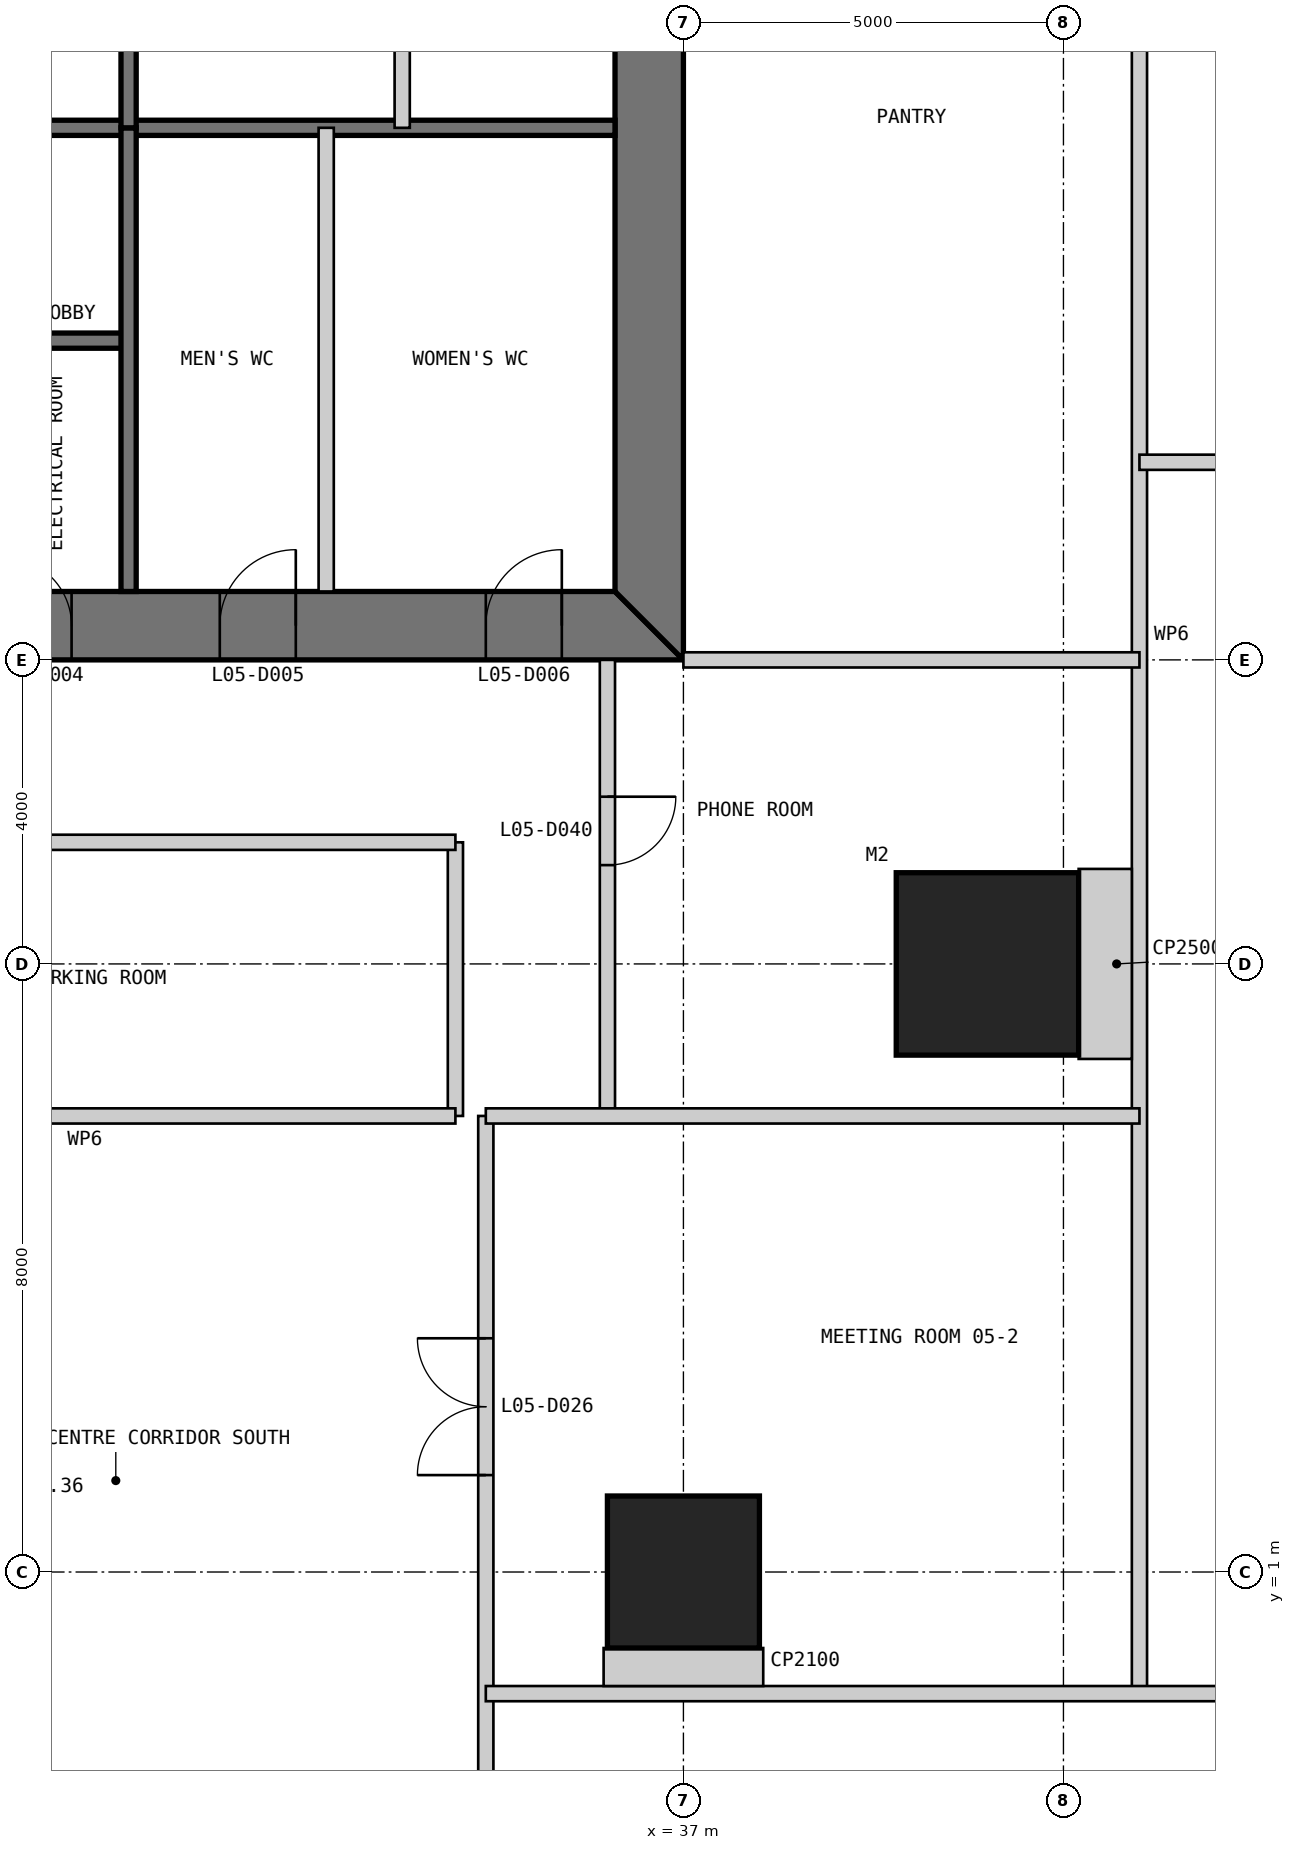
"""IFC4 building model, lengths in metres.
Left out: names, types, materials, properties, quantities, classifications, styles, units other than length and angle.
Written with IfcOpenShell. Run it as: python <this file> out.ifc"""

import sys

from ifc_helpers import new_model, si_unit, direction, frame, frame_2d, origin, origin_2d, place, context, subcontext, project, spatial, polyline, rectangle, outline, extrude, element, fill, save


model = new_model("IFC4")
c1 = context("Model", 3, precision=1e-05, world=origin(), true_north=direction((0.0, 1.0)))
c2 = subcontext(c1, "Body", "Model", "MODEL_VIEW")
j1 = project(units=[si_unit("LENGTHUNIT", "METRE"), si_unit("PLANEANGLEUNIT", "RADIAN")], contexts=[c1])
p1 = place(None, origin())
s1 = spatial("IfcSite", under=j1, at=p1, CompositionType="ELEMENT")
p2 = place(p1, origin())
s2 = spatial("IfcBuilding", under=s1, at=p2, CompositionType="ELEMENT")
p3 = place(p2, frame((0.0, 0.0, 26.2)))
s3 = spatial("IfcBuildingStorey", under=s2, at=p3, CompositionType="ELEMENT", Elevation=26.2)
p4 = place(p3, frame((41.0, 9.0, 0.0), z_axis=(0.0, 0.0, 1.0), x_axis=(1.0, 0.0, 0.0)))
e1 = element("IfcColumn", 1, at=p4, inside=s3, PredefinedType="COLUMN", context=c2, shape_type="SweptSolid", body=[
    extrude(rectangle(XDim=2.4, YDim=2.4, at=origin_2d()), origin(), (0.0, 0.0, 1.0), 4.8),
])
p5 = place(p3, frame((37.0, 1.0, 0.0), z_axis=(0.0, 0.0, 1.0), x_axis=(1.0, 0.0, 0.0)))
e2 = element("IfcColumn", 2, at=p5, inside=s3, PredefinedType="COLUMN", context=c2, shape_type="SweptSolid", body=[
    extrude(rectangle(XDim=2.0, YDim=2.0, at=origin_2d()), origin(), (0.0, 0.0, 1.0), 4.8),
])
p6 = place(p3, frame((13.0, 13.45, 0.0), z_axis=(0.0, 0.0, 1.0), x_axis=(1.0, 0.0, 0.0)))
e3 = element("IfcWall", 3, at=p6, inside=s3, PredefinedType="SHEAR", context=c2, shape_type="SweptSolid", body=[
    extrude(outline(polyline([(0.0, -0.45), (24.0, -0.45), (23.1, 0.45), (0.9, 0.45), (0.0, -0.45)])), origin(), (0.0, 0.0, 1.0), 4.8),
])
p7 = place(p6, frame((4.9, 0.0, 0.0)))
e4 = element("IfcOpeningElement", 4, at=p7, cuts=e3, PredefinedType="OPENING", context=c2, shape_type="SweptSolid", body=[
    extrude(rectangle(XDim=1.0, YDim=2.2, at=frame_2d((0.5, 1.1))), frame((0.0, 0.46, 0.0), z_axis=(0.0, -1.0, 0.0), x_axis=(1.0, 0.0, 0.0)), (0.0, 0.0, 1.0), 0.92),
])
p8 = place(p6, frame((8.9, 0.0, 0.0)))
e5 = element("IfcOpeningElement", 5, at=p8, cuts=e3, PredefinedType="OPENING", context=c2, shape_type="SweptSolid", body=[
    extrude(rectangle(XDim=1.1, YDim=2.2, at=frame_2d((0.55, 1.1))), frame((0.0, 0.46, 0.0), z_axis=(0.0, -1.0, 0.0), x_axis=(1.0, 0.0, 0.0)), (0.0, 0.0, 1.0), 0.92),
])
p9 = place(p6, frame((15.05, 0.0, 0.0)))
e6 = element("IfcOpeningElement", 6, at=p9, cuts=e3, PredefinedType="OPENING", context=c2, shape_type="SweptSolid", body=[
    extrude(rectangle(XDim=0.9, YDim=2.2, at=frame_2d((0.45, 1.1))), frame((0.0, 0.46, 0.0), z_axis=(0.0, -1.0, 0.0), x_axis=(1.0, 0.0, 0.0)), (0.0, 0.0, 1.0), 0.92),
])
p10 = place(p6, frame((17.9, 0.0, 0.0)))
e7 = element("IfcOpeningElement", 7, at=p10, cuts=e3, PredefinedType="OPENING", context=c2, shape_type="SweptSolid", body=[
    extrude(rectangle(XDim=1.0, YDim=2.2, at=frame_2d((0.5, 1.1))), frame((0.0, 0.46, 0.0), z_axis=(0.0, -1.0, 0.0), x_axis=(1.0, 0.0, 0.0)), (0.0, 0.0, 1.0), 0.92),
])
p11 = place(p6, frame((21.4, 0.0, 0.0)))
e8 = element("IfcOpeningElement", 8, at=p11, cuts=e3, PredefinedType="OPENING", context=c2, shape_type="SweptSolid", body=[
    extrude(rectangle(XDim=1.0, YDim=2.2, at=frame_2d((0.5, 1.1))), frame((0.0, 0.46, 0.0), z_axis=(0.0, -1.0, 0.0), x_axis=(1.0, 0.0, 0.0)), (0.0, 0.0, 1.0), 0.92),
])
p12 = place(p3, frame((36.55, 13.9, 0.0), z_axis=(0.0, 0.0, 1.0), x_axis=(0.0, 1.0, 0.0)))
e9 = element("IfcWall", 9, at=p12, inside=s3, PredefinedType="SHEAR", context=c2, shape_type="SweptSolid", body=[
    extrude(outline(polyline([(-0.9, -0.45), (23.1, -0.45), (22.2, 0.45), (0.0, 0.45), (-0.9, -0.45)])), origin(), (0.0, 0.0, 1.0), 4.8),
])
p13 = place(p12, frame((20.2, 0.0, 0.0)))
e10 = element("IfcOpeningElement", 10, at=p13, cuts=e9, PredefinedType="OPENING", context=c2, shape_type="SweptSolid", body=[
    extrude(rectangle(XDim=1.0, YDim=2.2, at=frame_2d((0.5, 1.1))), frame((0.0, 0.46, 0.0), z_axis=(0.0, -1.0, 0.0), x_axis=(1.0, 0.0, 0.0)), (0.0, 0.0, 1.0), 0.92),
])
p14 = place(p12, frame((17.25, 0.0, 0.0)))
e11 = element("IfcOpeningElement", 11, at=p14, cuts=e9, PredefinedType="OPENING", context=c2, shape_type="SweptSolid", body=[
    extrude(rectangle(XDim=0.9, YDim=2.2, at=frame_2d((0.45, 1.1))), frame((0.0, 0.46, 0.0), z_axis=(0.0, -1.0, 0.0), x_axis=(1.0, 0.0, 0.0)), (0.0, 0.0, 1.0), 0.92),
])
p15 = place(p3, frame((20.3, 17.2, 0.0), z_axis=(0.0, 0.0, 1.0), x_axis=(1.0, 0.0, 0.0)))
e12 = element("IfcWall", 12, at=p15, inside=s3, PredefinedType="SOLIDWALL", context=c2, shape_type="SweptSolid", body=[
    extrude(rectangle(XDim=9.4, YDim=0.2, at=frame_2d((4.7, 0.0))), origin(), (0.0, 0.0, 1.0), 4.6),
])
p16 = place(p15, frame((0.25, 0.0, 0.0)))
e13 = element("IfcOpeningElement", 13, at=p16, cuts=e12, PredefinedType="OPENING", context=c2, shape_type="SweptSolid", body=[
    extrude(rectangle(XDim=1.0, YDim=2.2, at=frame_2d((0.5, 1.1))), frame((0.0, 0.11, 0.0), z_axis=(0.0, -1.0, 0.0), x_axis=(1.0, 0.0, 0.0)), (0.0, 0.0, 1.0), 0.22),
])
p17 = place(p3, frame((20.3, 20.0, 0.0), z_axis=(0.0, 0.0, 1.0), x_axis=(1.0, 0.0, 0.0)))
e14 = element("IfcWall", 14, at=p17, inside=s3, PredefinedType="SOLIDWALL", context=c2, shape_type="SweptSolid", body=[
    extrude(rectangle(XDim=15.8, YDim=0.2, at=frame_2d((7.9, 0.0))), origin(), (0.0, 0.0, 1.0), 4.6),
])
p18 = place(p3, frame((29.7, 13.9, 0.0), z_axis=(0.0, 0.0, 1.0), x_axis=(0.0, 1.0, 0.0)))
e15 = element("IfcWall", 15, at=p18, inside=s3, PredefinedType="SOLIDWALL", context=c2, shape_type="SweptSolid", body=[
    extrude(rectangle(XDim=6.1, YDim=0.2, at=frame_2d((3.05, 0.0))), origin(), (0.0, 0.0, 1.0), 4.6),
])
p19 = place(p3, frame((32.3, 13.9, 0.0), z_axis=(0.0, 0.0, 1.0), x_axis=(0.0, 1.0, 0.0)))
e16 = element("IfcWall", 16, at=p19, inside=s3, PredefinedType="PARTITIONING", context=c2, shape_type="SweptSolid", body=[
    extrude(rectangle(XDim=6.1, YDim=0.2, at=frame_2d((3.05, 0.0))), origin(), (0.0, 0.0, 1.0), 4.6),
])
p20 = place(p3, frame((33.3, 36.1, 0.0), z_axis=(0.0, 0.0, 1.0), x_axis=(0.0, -1.0, 0.0)))
e17 = element("IfcWall", 17, at=p20, inside=s3, PredefinedType="PARTITIONING", context=c2, shape_type="SweptSolid", body=[
    extrude(rectangle(XDim=16.1, YDim=0.2, at=frame_2d((8.05, 0.0))), origin(), (0.0, 0.0, 1.0), 4.6),
])
p21 = place(p20, frame((4.4, 0.0, 0.0)))
e18 = element("IfcOpeningElement", 18, at=p21, cuts=e17, PredefinedType="OPENING", context=c2, shape_type="SweptSolid", body=[
    extrude(rectangle(XDim=0.9, YDim=2.2, at=frame_2d((0.45, 1.1))), frame((0.0, 0.11, 0.0), z_axis=(0.0, -1.0, 0.0), x_axis=(1.0, 0.0, 0.0)), (0.0, 0.0, 1.0), 0.22),
])
p22 = place(p3, frame((29.7, 36.1, 0.0), z_axis=(0.0, 0.0, 1.0), x_axis=(0.0, -1.0, 0.0)))
e19 = element("IfcWall", 19, at=p22, inside=s3, PredefinedType="SOLIDWALL", context=c2, shape_type="SweptSolid", body=[
    extrude(rectangle(XDim=16.1, YDim=0.2, at=frame_2d((8.05, 0.0))), origin(), (0.0, 0.0, 1.0), 4.6),
])
p23 = place(p3, frame((34.0, 7.0, 0.0), z_axis=(0.0, 0.0, 1.0), x_axis=(0.0, 1.0, 0.0)))
e20 = element("IfcWall", 20, at=p23, inside=s3, PredefinedType="PARTITIONING", context=c2, shape_type="SweptSolid", body=[
    extrude(rectangle(XDim=3.6, YDim=0.2, at=frame_2d((1.8, 0.0))), origin(), (0.0, 0.0, 1.0), 3.893),
])
p24 = place(p3, frame((34.4, -7.25, 0.0), z_axis=(0.0, 0.0, 1.0), x_axis=(0.0, 1.0, 0.0)))
e21 = element("IfcWall", 21, at=p24, inside=s3, PredefinedType="PARTITIONING", context=c2, shape_type="SweptSolid", body=[
    extrude(rectangle(XDim=14.25, YDim=0.2, at=frame_2d((7.125, 0.0))), origin(), (0.0, 0.0, 1.0), 4.5),
])
p25 = place(p24, frame((2.45, 0.0, 0.0)))
e22 = element("IfcOpeningElement", 22, at=p25, cuts=e21, PredefinedType="OPENING", context=c2, shape_type="SweptSolid", body=[
    extrude(rectangle(XDim=1.8, YDim=2.4, at=frame_2d((0.9, 1.2))), frame((0.0, 0.11, 0.0), z_axis=(0.0, -1.0, 0.0), x_axis=(1.0, 0.0, 0.0)), (0.0, 0.0, 1.0), 0.22),
])
p26 = place(p24, frame((9.525, 0.0, 0.0)))
e23 = element("IfcOpeningElement", 23, at=p26, cuts=e21, PredefinedType="OPENING", context=c2, shape_type="SweptSolid", body=[
    extrude(rectangle(XDim=1.8, YDim=2.4, at=frame_2d((0.9, 1.2))), frame((0.0, 0.11, 0.0), z_axis=(0.0, -1.0, 0.0), x_axis=(1.0, 0.0, 0.0)), (0.0, 0.0, 1.0), 0.22),
])
p27 = place(p3, frame((36.0, 7.0, 0.0), z_axis=(0.0, 0.0, 1.0), x_axis=(0.0, 1.0, 0.0)))
e24 = element("IfcWall", 24, at=p27, inside=s3, PredefinedType="PARTITIONING", context=c2, shape_type="SweptSolid", body=[
    extrude(rectangle(XDim=6.0, YDim=0.2, at=frame_2d((3.0, 0.0))), origin(), (0.0, 0.0, 1.0), 4.5),
])
p28 = place(p27, frame((3.3, 0.0, 0.0)))
e25 = element("IfcOpeningElement", 25, at=p28, cuts=e24, PredefinedType="OPENING", context=c2, shape_type="SweptSolid", body=[
    extrude(rectangle(XDim=0.9, YDim=2.2, at=frame_2d((0.45, 1.1))), frame((0.0, 0.11, 0.0), z_axis=(0.0, -1.0, 0.0), x_axis=(1.0, 0.0, 0.0)), (0.0, 0.0, 1.0), 0.22),
])
p29 = place(p3, frame((43.0, -0.6, 0.0), z_axis=(0.0, 0.0, 1.0), x_axis=(0.0, 1.0, 0.0)))
e26 = element("IfcWall", 26, at=p29, inside=s3, PredefinedType="PARTITIONING", context=c2, shape_type="SweptSolid", body=[
    extrude(rectangle(XDim=28.6, YDim=0.2, at=frame_2d((14.3, 0.0))), origin(), (0.0, 0.0, 1.0), 3.893),
])
p30 = place(p3, frame((34.4, -0.6, 0.0), z_axis=(0.0, 0.0, 1.0), x_axis=(1.0, 0.0, 0.0)))
e27 = element("IfcWall", 27, at=p30, inside=s3, PredefinedType="PARTITIONING", context=c2, shape_type="SweptSolid", body=[
    extrude(rectangle(XDim=16.2, YDim=0.2, at=frame_2d((8.1, 0.0))), origin(), (0.0, 0.0, 1.0), 4.5),
])
p31 = place(p3, frame((-0.6, 7.0, 0.0), z_axis=(0.0, 0.0, 1.0), x_axis=(1.0, 0.0, 0.0)))
e28 = element("IfcWall", 28, at=p31, inside=s3, PredefinedType="PARTITIONING", context=c2, shape_type="SweptSolid", body=[
    extrude(rectangle(XDim=34.6, YDim=0.2, at=frame_2d((17.3, 0.0))), origin(), (0.0, 0.0, 1.0), 4.5),
])
p32 = place(p31, frame((14.15, 0.0, 0.0)))
e29 = element("IfcOpeningElement", 29, at=p32, cuts=e28, PredefinedType="OPENING", context=c2, shape_type="SweptSolid", body=[
    extrude(rectangle(XDim=0.9, YDim=2.2, at=frame_2d((0.45, 1.1))), frame((0.0, 0.11, 0.0), z_axis=(0.0, -1.0, 0.0), x_axis=(1.0, 0.0, 0.0)), (0.0, 0.0, 1.0), 0.22),
])
p33 = place(p3, frame((34.4, 7.0, 0.0), z_axis=(0.0, 0.0, 1.0), x_axis=(1.0, 0.0, 0.0)))
e30 = element("IfcWall", 30, at=p33, inside=s3, PredefinedType="PARTITIONING", context=c2, shape_type="SweptSolid", body=[
    extrude(rectangle(XDim=8.6, YDim=0.2, at=frame_2d((4.3, 0.0))), origin(), (0.0, 0.0, 1.0), 4.5),
])
p34 = place(p3, frame((16.4, 10.6, 0.0), z_axis=(0.0, 0.0, 1.0), x_axis=(1.0, 0.0, 0.0)))
e31 = element("IfcWall", 31, at=p34, inside=s3, PredefinedType="PARTITIONING", context=c2, shape_type="SweptSolid", body=[
    extrude(rectangle(XDim=17.6, YDim=0.2, at=frame_2d((8.8, 0.0))), origin(), (0.0, 0.0, 1.0), 4.5),
])
p35 = place(p34, frame((8.65, 0.0, 0.0)))
e32 = element("IfcOpeningElement", 32, at=p35, cuts=e31, PredefinedType="OPENING", context=c2, shape_type="SweptSolid", body=[
    extrude(rectangle(XDim=1.8, YDim=2.4, at=frame_2d((0.9, 1.2))), frame((0.0, 0.11, 0.0), z_axis=(0.0, -1.0, 0.0), x_axis=(1.0, 0.0, 0.0)), (0.0, 0.0, 1.0), 0.22),
])
p36 = place(p3, frame((37.0, 13.0, 0.0), z_axis=(0.0, 0.0, 1.0), x_axis=(1.0, 0.0, 0.0)))
e33 = element("IfcWall", 33, at=p36, inside=s3, PredefinedType="PARTITIONING", context=c2, shape_type="SweptSolid", body=[
    extrude(rectangle(XDim=6.0, YDim=0.2, at=frame_2d((3.0, 0.0))), origin(), (0.0, 0.0, 1.0), 3.703),
])
p37 = place(p3, frame((43.0, 15.6, 0.0), z_axis=(0.0, 0.0, 1.0), x_axis=(1.0, 0.0, 0.0)))
e34 = element("IfcWall", 34, at=p37, inside=s3, PredefinedType="PARTITIONING", context=c2, shape_type="SweptSolid", body=[
    extrude(rectangle(XDim=14.25, YDim=0.2, at=frame_2d((7.125, 0.0))), origin(), (0.0, 0.0, 1.0), 4.5),
])
p38 = place(p37, frame((10.0, 0.0, 0.0)))
e35 = element("IfcOpeningElement", 35, at=p38, cuts=e34, PredefinedType="OPENING", context=c2, shape_type="SweptSolid", body=[
    extrude(rectangle(XDim=1.8, YDim=2.4, at=frame_2d((0.9, 1.2))), frame((0.0, 0.11, 0.0), z_axis=(0.0, -1.0, 0.0), x_axis=(1.0, 0.0, 0.0)), (0.0, 0.0, 1.0), 0.22),
])
p39 = place(p37, frame((2.925, 0.0, 0.0)))
e36 = element("IfcOpeningElement", 36, at=p39, cuts=e34, PredefinedType="OPENING", context=c2, shape_type="SweptSolid", body=[
    extrude(rectangle(XDim=1.8, YDim=2.4, at=frame_2d((0.9, 1.2))), frame((0.0, 0.11, 0.0), z_axis=(0.0, -1.0, 0.0), x_axis=(1.0, 0.0, 0.0)), (0.0, 0.0, 1.0), 0.22),
])
p40 = place(p3, frame((37.0, -0.5, 0.0), z_axis=(0.0, 0.0, 1.0), x_axis=(0.0, 1.0, 0.0)))
e37 = element("IfcWall", 37, at=p40, inside=s3, PredefinedType="PARTITIONING", context=c2, shape_type="SweptSolid", body=[
    extrude(rectangle(XDim=0.5, YDim=2.1, at=frame_2d((0.25, 0.0))), origin(), (0.0, 0.0, 1.0), 4.5),
])
p41 = place(p3, frame((42.9, 9.0, 0.0), z_axis=(0.0, 0.0, 1.0), x_axis=(-1.0, 0.0, 0.0)))
e38 = element("IfcWall", 38, at=p41, inside=s3, PredefinedType="PARTITIONING", context=c2, shape_type="SweptSolid", body=[
    extrude(rectangle(XDim=0.7, YDim=2.5, at=frame_2d((0.35, 0.0))), origin(), (0.0, 0.0, 1.0), 4.5),
])
p42 = place(p9, origin())
e39 = element("IfcDoor", 39, at=p42, inside=s3, OperationType="SINGLE_SWING_LEFT", PredefinedType="DOOR", context=c2, shape_type="SweptSolid", body=[
    extrude(rectangle(XDim=0.9, YDim=2.2, at=frame_2d((0.45, 1.1))), frame((0.0, 0.025, 0.0), z_axis=(0.0, -1.0, 0.0), x_axis=(1.0, 0.0, 0.0)), (0.0, 0.0, 1.0), 0.05),
    extrude(outline(polyline([(0.0, 0.0), (0.04, 0.0), (0.04, 2.16), (0.86, 2.16), (0.86, 0.0), (0.9, 0.0), (0.9, 2.2), (0.0, 2.2), (0.0, 0.0)])), frame((0.0, 0.3, 0.0), z_axis=(0.0, -1.0, 0.0), x_axis=(1.0, 0.0, 0.0)), (0.0, 0.0, 1.0), 0.6),
])
fill(e6, e39)
p43 = place(p10, origin())
e40 = element("IfcDoor", 40, at=p43, inside=s3, OperationType="SINGLE_SWING_RIGHT", PredefinedType="DOOR", context=c2, shape_type="SweptSolid", body=[
    extrude(rectangle(XDim=1.0, YDim=2.2, at=frame_2d((0.5, 1.1))), frame((0.0, 0.025, 0.0), z_axis=(0.0, -1.0, 0.0), x_axis=(1.0, 0.0, 0.0)), (0.0, 0.0, 1.0), 0.05),
    extrude(outline(polyline([(0.0, 0.0), (0.04, 0.0), (0.04, 2.16), (0.96, 2.16), (0.96, 0.0), (1.0, 0.0), (1.0, 2.2), (0.0, 2.2), (0.0, 0.0)])), frame((0.0, 0.3, 0.0), z_axis=(0.0, -1.0, 0.0), x_axis=(1.0, 0.0, 0.0)), (0.0, 0.0, 1.0), 0.6),
])
fill(e7, e40)
p44 = place(p11, origin())
e41 = element("IfcDoor", 41, at=p44, inside=s3, OperationType="SINGLE_SWING_RIGHT", PredefinedType="DOOR", context=c2, shape_type="SweptSolid", body=[
    extrude(rectangle(XDim=1.0, YDim=2.2, at=frame_2d((0.5, 1.1))), frame((0.0, 0.025, 0.0), z_axis=(0.0, -1.0, 0.0), x_axis=(1.0, 0.0, 0.0)), (0.0, 0.0, 1.0), 0.05),
    extrude(outline(polyline([(0.0, 0.0), (0.04, 0.0), (0.04, 2.16), (0.96, 2.16), (0.96, 0.0), (1.0, 0.0), (1.0, 2.2), (0.0, 2.2), (0.0, 0.0)])), frame((0.0, 0.3, 0.0), z_axis=(0.0, -1.0, 0.0), x_axis=(1.0, 0.0, 0.0)), (0.0, 0.0, 1.0), 0.6),
])
fill(e8, e41)
p45 = place(p26, origin())
e42 = element("IfcDoor", 42, at=p45, inside=s3, OperationType="DOUBLE_DOOR_SINGLE_SWING", PredefinedType="DOOR", context=c2, shape_type="SweptSolid", body=[
    extrude(rectangle(XDim=1.8, YDim=2.4, at=frame_2d((0.9, 1.2))), frame((0.0, 0.025, 0.0), z_axis=(0.0, -1.0, 0.0), x_axis=(1.0, 0.0, 0.0)), (0.0, 0.0, 1.0), 0.05),
])
fill(e23, e42)
p46 = place(p28, frame((0.9, 0.0, 0.0), z_axis=(0.0, 0.0, 1.0), x_axis=(-1.0, 0.0, 0.0)))
e43 = element("IfcDoor", 43, at=p46, inside=s3, OperationType="SINGLE_SWING_LEFT", PredefinedType="DOOR", context=c2, shape_type="SweptSolid", body=[
    extrude(rectangle(XDim=0.9, YDim=2.2, at=frame_2d((0.45, 1.1))), frame((0.0, 0.025, 0.0), z_axis=(0.0, -1.0, 0.0), x_axis=(1.0, 0.0, 0.0)), (0.0, 0.0, 1.0), 0.05),
])
fill(e25, e43)
save(model, sys.argv[1])
